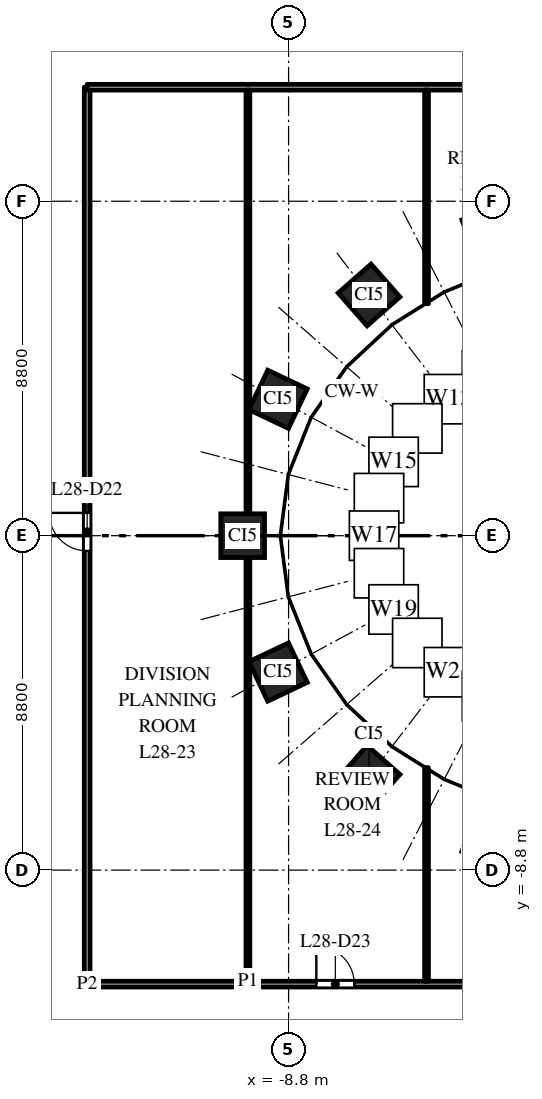
"""IFC4 building model, lengths in metres.
Left out: names, types, materials, properties, quantities, classifications, styles, units other than length and angle.
Written with IfcOpenShell. Run it as: python <this file> out.ifc"""

import sys

from ifc_helpers import new_model, si_unit, direction, frame, frame_2d, origin, origin_2d, place, context, subcontext, project, spatial, rectangle, extrude, element, fill, save


model = new_model("IFC4")
c1 = context("Model", 3, precision=1e-05, world=origin(), true_north=direction((0.0, 1.0)))
c2 = subcontext(c1, "Body", "Model", "MODEL_VIEW")
j1 = project(units=[si_unit("LENGTHUNIT", "METRE"), si_unit("PLANEANGLEUNIT", "RADIAN")], contexts=[c1])
p1 = place(None, origin())
s1 = spatial("IfcSite", under=j1, at=p1, CompositionType="ELEMENT")
p2 = place(p1, origin())
s2 = spatial("IfcBuilding", under=s1, at=p2, CompositionType="ELEMENT")
p3 = place(p2, frame((0.0, 0.0, 124.0)))
s3 = spatial("IfcBuildingStorey", under=s2, at=p3, CompositionType="ELEMENT", Elevation=124.0)
for number, where, z_axis, x_axis in (
    (1, (-6.682, 6.334, 0.0), (0.0, 0.0, 1.0), (-0.751, -0.66, 0.0)),
    (2, (-9.076, 3.588, 0.0), (0.0, 0.0, 1.0), (-0.429, -0.903, 0.0)),
    (3, (-10.008, 0.0, 0.0), (0.0, 0.0, 1.0), (0.0, -1.0, 0.0)),
    (4, (-9.076, -3.588, 0.0), (0.0, 0.0, 1.0), (0.429, -0.903, 0.0)),
    (5, (-6.682, -6.334, 0.0), (0.0, 0.0, 1.0), (0.751, -0.66, 0.0)),
):
    element("IfcColumn", number, at=place(p3, frame(where, z_axis=z_axis, x_axis=x_axis)), inside=s3, PredefinedType="COLUMN", context=c2, shape_type="SweptSolid", body=[
        extrude(rectangle(XDim=1.15, YDim=1.15, at=origin_2d()), origin(), (0.0, 0.0, 1.0), 4.0),
    ])
p4 = place(p3, frame((-14.1, -11.8, 0.0), z_axis=(0.0, 0.0, 1.0), x_axis=(0.0, 1.0, 0.0)))
e6 = element("IfcWall", 6, at=p4, inside=s3, PredefinedType="PARTITIONING", context=c2, shape_type="SweptSolid", body=[
    extrude(rectangle(XDim=23.6, YDim=0.15, at=frame_2d((11.8, 0.0))), origin(), (0.0, 0.0, 1.0), 2.75),
])
p5 = place(p4, frame((11.4, 0.0, 0.0)))
e7 = element("IfcOpeningElement", 7, at=p5, cuts=e6, PredefinedType="OPENING", context=c2, shape_type="SweptSolid", body=[
    extrude(rectangle(XDim=1.0, YDim=2.1, at=frame_2d((0.5, 1.05))), frame((0.0, 0.085, 0.0), z_axis=(0.0, -1.0, 0.0), x_axis=(1.0, 0.0, 0.0)), (0.0, 0.0, 1.0), 0.17),
])
p6 = place(p3, frame((-14.1, -11.8, 0.0), z_axis=(0.0, 0.0, 1.0), x_axis=(1.0, 0.0, 0.0)))
e8 = element("IfcWall", 8, at=p6, inside=s3, PredefinedType="PARTITIONING", context=c2, shape_type="SweptSolid", body=[
    extrude(rectangle(XDim=28.2, YDim=0.15, at=frame_2d((14.1, 0.0))), origin(), (0.0, 0.0, 1.0), 2.85),
])
p7 = place(p6, frame((6.03, 0.0, 0.0)))
e9 = element("IfcOpeningElement", 9, at=p7, cuts=e8, PredefinedType="OPENING", context=c2, shape_type="SweptSolid", body=[
    extrude(rectangle(XDim=1.0, YDim=2.1, at=frame_2d((0.5, 1.05))), frame((0.0, 0.085, 0.0), z_axis=(0.0, -1.0, 0.0), x_axis=(1.0, 0.0, 0.0)), (0.0, 0.0, 1.0), 0.17),
])
p8 = place(p6, frame((10.73, 0.0, 0.0)))
e10 = element("IfcOpeningElement", 10, at=p8, cuts=e8, PredefinedType="OPENING", context=c2, shape_type="SweptSolid", body=[
    extrude(rectangle(XDim=1.0, YDim=2.1, at=frame_2d((0.5, 1.05))), frame((0.0, 0.085, 0.0), z_axis=(0.0, -1.0, 0.0), x_axis=(1.0, 0.0, 0.0)), (0.0, 0.0, 1.0), 0.17),
])
p9 = place(p6, frame((15.43, 0.0, 0.0)))
e11 = element("IfcOpeningElement", 11, at=p9, cuts=e8, PredefinedType="OPENING", context=c2, shape_type="SweptSolid", body=[
    extrude(rectangle(XDim=1.0, YDim=2.1, at=frame_2d((0.5, 1.05))), frame((0.0, 0.085, 0.0), z_axis=(0.0, -1.0, 0.0), x_axis=(1.0, 0.0, 0.0)), (0.0, 0.0, 1.0), 0.17),
])
p10 = place(p3, frame((-14.1, 11.8, 0.0), z_axis=(0.0, 0.0, 1.0), x_axis=(1.0, 0.0, 0.0)))
e12 = element("IfcWall", 12, at=p10, inside=s3, PredefinedType="PARTITIONING", context=c2, shape_type="SweptSolid", body=[
    extrude(rectangle(XDim=18.33, YDim=0.15, at=frame_2d((9.165, 0.0))), origin(), (0.0, 0.0, 1.0), 2.85),
])
p11 = place(p10, frame((10.83, 0.0, 0.0)))
e13 = element("IfcOpeningElement", 13, at=p11, cuts=e12, PredefinedType="OPENING", context=c2, shape_type="SweptSolid", body=[
    extrude(rectangle(XDim=1.0, YDim=2.1, at=frame_2d((0.5, 1.05))), frame((0.0, 0.085, 0.0), z_axis=(0.0, -1.0, 0.0), x_axis=(1.0, 0.0, 0.0)), (0.0, 0.0, 1.0), 0.17),
])
p12 = place(p3, frame((-9.87, -11.725, 0.0), z_axis=(0.0, 0.0, 1.0), x_axis=(0.0, 1.0, 0.0)))
e14 = element("IfcWall", 14, at=p12, inside=s3, PredefinedType="PARTITIONING", context=c2, shape_type="SweptSolid", body=[
    extrude(rectangle(XDim=23.45, YDim=0.1, at=frame_2d((11.725, 0.0))), origin(), (0.0, 0.0, 1.0), 2.75),
])
for number, where, z_axis, x_axis in (
    (15, (-5.17, -11.725, 0.0), (0.0, 0.0, 1.0), (0.0, 1.0, 0.0)),
    (16, (-5.17, 6.105, 0.0), (0.0, 0.0, 1.0), (0.0, 1.0, 0.0)),
):
    element("IfcWall", number, at=place(p3, frame(where, z_axis=z_axis, x_axis=x_axis)), inside=s3, PredefinedType="PARTITIONING", context=c2, shape_type="SweptSolid", body=[
        extrude(rectangle(XDim=5.62, YDim=0.1, at=frame_2d((2.81, 0.0))), origin(), (0.0, 0.0, 1.0), 2.9),
    ])
p13 = place(p5, origin())
e17 = element("IfcDoor", 17, at=p13, inside=s3, OperationType="SINGLE_SWING_RIGHT", PredefinedType="DOOR", context=c2, shape_type="SweptSolid", body=[
    extrude(rectangle(XDim=1.0, YDim=2.1, at=frame_2d((0.5, 1.05))), frame((0.0, 0.025, 0.0), z_axis=(0.0, -1.0, 0.0), x_axis=(1.0, 0.0, 0.0)), (0.0, 0.0, 1.0), 0.05),
])
fill(e7, e17)
p14 = place(p7, origin())
e18 = element("IfcDoor", 18, at=p14, inside=s3, OperationType="SINGLE_SWING_LEFT", PredefinedType="DOOR", context=c2, shape_type="SweptSolid", body=[
    extrude(rectangle(XDim=1.0, YDim=2.1, at=frame_2d((0.5, 1.05))), frame((0.0, 0.025, 0.0), z_axis=(0.0, -1.0, 0.0), x_axis=(1.0, 0.0, 0.0)), (0.0, 0.0, 1.0), 0.05),
])
fill(e9, e18)
save(model, sys.argv[1])
